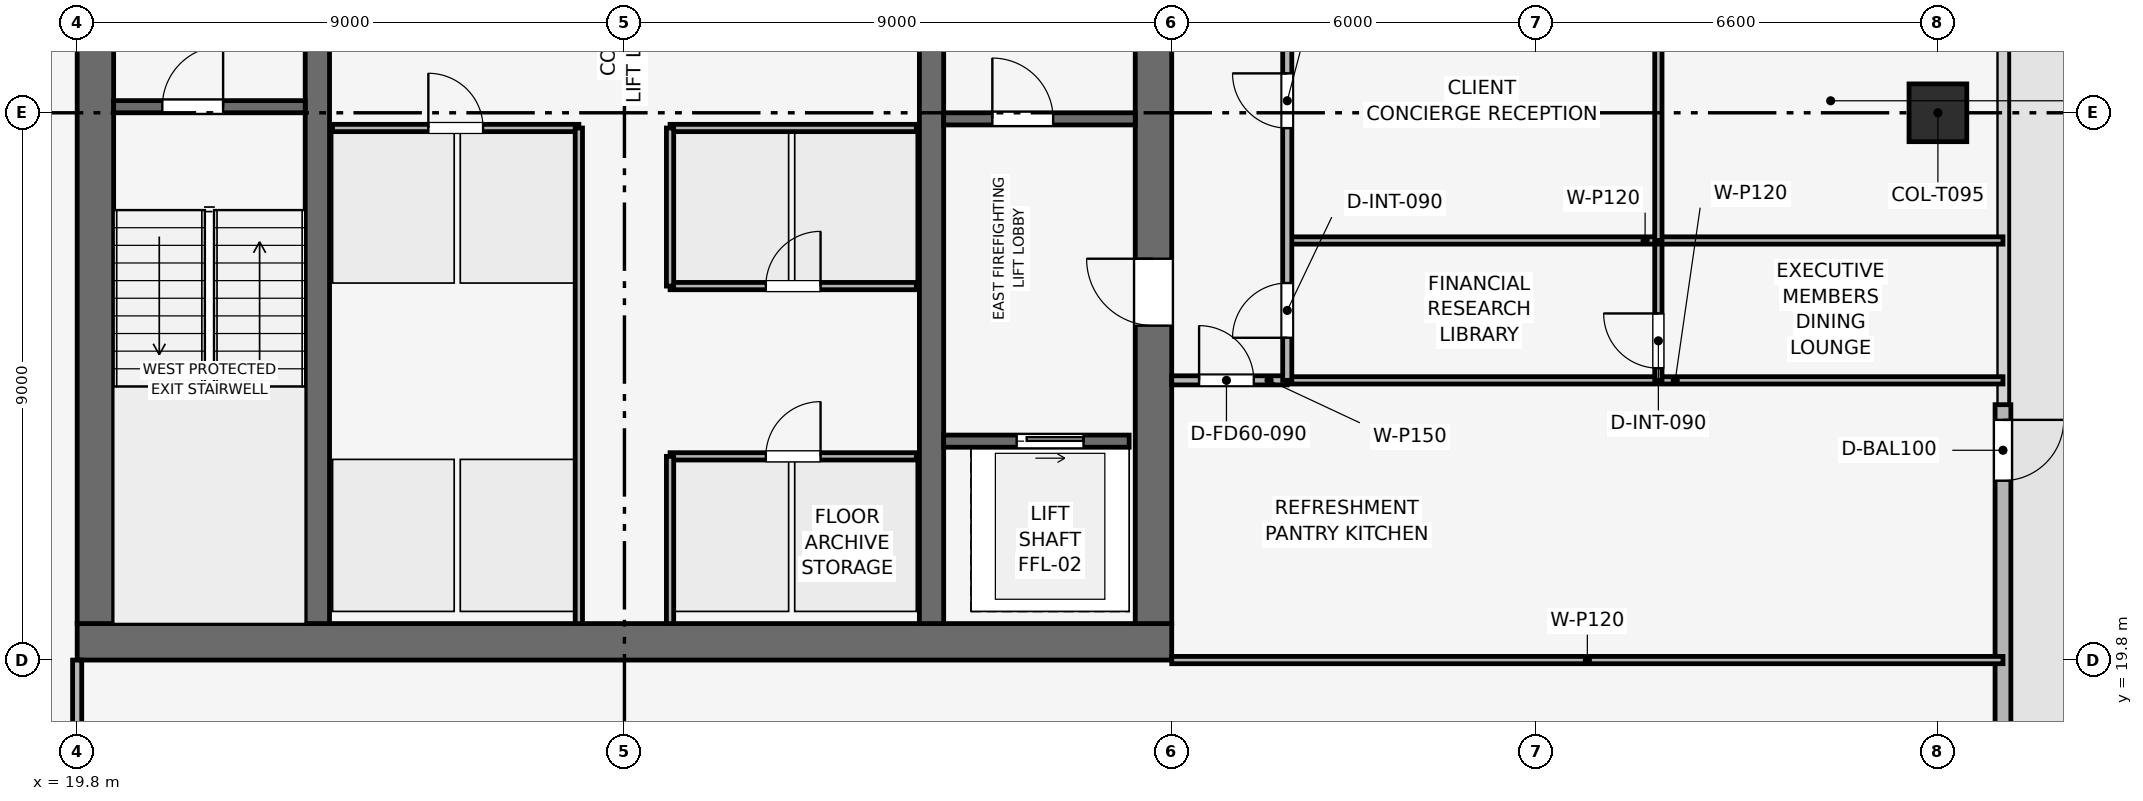
"""IFC4 building model, lengths in metres.
Left out: names, types, materials, properties, quantities, classifications, styles, units other than length and angle.
Written with IfcOpenShell. Run it as: python <this file> out.ifc"""

import sys

from ifc_helpers import new_model, si_unit, direction, frame, frame_2d, origin, origin_2d, place, context, subcontext, project, spatial, rectangle, extrude, element, fill, save


model = new_model("IFC4")
c1 = context("Model", 3, precision=1e-05, world=origin(), true_north=direction((0.0, 1.0)))
c2 = subcontext(c1, "Body", "Model", "MODEL_VIEW")
j1 = project(units=[si_unit("LENGTHUNIT", "METRE"), si_unit("PLANEANGLEUNIT", "RADIAN")], contexts=[c1])
p1 = place(None, origin())
s1 = spatial("IfcSite", under=j1, at=p1, CompositionType="ELEMENT")
p2 = place(p1, origin())
s2 = spatial("IfcBuilding", under=s1, at=p2, CompositionType="ELEMENT")
p3 = place(p2, frame((0.0, 0.0, 303.0)))
s3 = spatial("IfcBuildingStorey", under=s2, at=p3, CompositionType="ELEMENT", Elevation=303.0)
p4 = place(p3, frame((19.8, 20.1, 0.0), z_axis=(0.0, 0.0, 1.0), x_axis=(1.0, 0.0, 0.0)))
e1 = element("IfcWall", 1, at=p4, inside=s3, PredefinedType="SHEAR", context=c2, shape_type="SweptSolid", body=[
    extrude(rectangle(XDim=18.0, YDim=0.6, at=frame_2d((9.0, 0.0))), origin(), (0.0, 0.0, 1.0), 3.75),
])
p5 = place(p3, frame((20.1, 20.4, 0.0), z_axis=(0.0, 0.0, 1.0), x_axis=(0.0, 1.0, 0.0)))
e2 = element("IfcWall", 2, at=p5, inside=s3, PredefinedType="SHEAR", context=c2, shape_type="SweptSolid", body=[
    extrude(rectangle(XDim=16.8, YDim=0.6, at=frame_2d((8.4, 0.0))), origin(), (0.0, 0.0, 1.0), 3.75),
])
p6 = place(p5, frame((10.4, 0.0, 0.0)))
e3 = element("IfcOpeningElement", 3, at=p6, cuts=e2, PredefinedType="OPENING", context=c2, shape_type="SweptSolid", body=[
    extrude(rectangle(XDim=1.1, YDim=2.15, at=frame_2d((0.55, 1.075))), frame((0.0, 0.31, 0.0), z_axis=(0.0, -1.0, 0.0), x_axis=(1.0, 0.0, 0.0)), (0.0, 0.0, 1.0), 0.62),
])
p7 = place(p3, frame((37.5, 20.4, 0.0), z_axis=(0.0, 0.0, 1.0), x_axis=(0.0, 1.0, 0.0)))
e4 = element("IfcWall", 4, at=p7, inside=s3, PredefinedType="SHEAR", context=c2, shape_type="SweptSolid", body=[
    extrude(rectangle(XDim=16.8, YDim=0.6, at=frame_2d((8.4, 0.0))), origin(), (0.0, 0.0, 1.0), 3.75),
])
p8 = place(p7, frame((4.9, 0.0, 0.0)))
e5 = element("IfcOpeningElement", 5, at=p8, cuts=e4, PredefinedType="OPENING", context=c2, shape_type="SweptSolid", body=[
    extrude(rectangle(XDim=1.1, YDim=2.15, at=frame_2d((0.55, 1.075))), frame((0.0, 0.31, 0.0), z_axis=(0.0, -1.0, 0.0), x_axis=(1.0, 0.0, 0.0)), (0.0, 0.0, 1.0), 0.62),
])
for number, where, z_axis, x_axis in (
    (6, (23.75, 20.4, 0.0), (0.0, 0.0, 1.0), (0.0, 1.0, 0.0)),
    (7, (33.85, 20.4, 0.0), (0.0, 0.0, 1.0), (0.0, 1.0, 0.0)),
):
    element("IfcWall", number, at=place(p3, frame(where, z_axis=z_axis, x_axis=x_axis)), inside=s3, PredefinedType="SHEAR", context=c2, shape_type="SweptSolid", body=[
        extrude(rectangle(XDim=16.8, YDim=0.4, at=frame_2d((8.4, 0.0))), origin(), (0.0, 0.0, 1.0), 3.75),
    ])
p9 = place(p3, frame((50.4, 28.8, 0.003), z_axis=(0.0, 0.0, 1.0), x_axis=(1.0, 0.0, 0.0)))
e8 = element("IfcColumn", 8, at=p9, inside=s3, PredefinedType="COLUMN", context=c2, shape_type="SweptSolid", body=[
    extrude(rectangle(XDim=0.95, YDim=0.95, at=origin_2d()), origin(), (0.0, 0.0, 1.0), 3.504),
])
p10 = place(p3, frame((51.47, 24.0, 0.0), z_axis=(0.0, 0.0, 1.0), x_axis=(0.0, -1.0, 0.0)))
e9 = element("IfcWall", 9, at=p10, inside=s3, PredefinedType="SOLIDWALL", context=c2, shape_type="SweptSolid", body=[
    extrude(rectangle(XDim=11.7, YDim=0.26, at=frame_2d((5.85, 0.0))), origin(), (0.0, 0.0, 1.0), 3.51),
])
p11 = place(p10, frame((0.25, 0.0, 0.0)))
e10 = element("IfcOpeningElement", 10, at=p11, cuts=e9, PredefinedType="OPENING", context=c2, shape_type="SweptSolid", body=[
    extrude(rectangle(XDim=1.0, YDim=2.2, at=frame_2d((0.5, 1.1))), frame((0.0, 0.14, 0.0), z_axis=(0.0, -1.0, 0.0), x_axis=(1.0, 0.0, 0.0)), (0.0, 0.0, 1.0), 0.28),
])
p12 = place(p3, frame((20.4, 28.9, 0.0), z_axis=(0.0, 0.0, 1.0), x_axis=(1.0, 0.0, 0.0)))
e11 = element("IfcWall", 11, at=p12, inside=s3, PredefinedType="SHEAR", context=c2, shape_type="SweptSolid", body=[
    extrude(rectangle(XDim=3.15, YDim=0.2, at=frame_2d((1.575, 0.0))), origin(), (0.0, 0.0, 1.0), 3.51),
])
p13 = place(p12, frame((0.8, 0.0, 0.0)))
e12 = element("IfcOpeningElement", 12, at=p13, cuts=e11, PredefinedType="OPENING", context=c2, shape_type="SweptSolid", body=[
    extrude(rectangle(XDim=1.0, YDim=2.1, at=frame_2d((0.5, 1.05))), frame((0.0, 0.11, 0.0), z_axis=(0.0, -1.0, 0.0), x_axis=(1.0, 0.0, 0.0)), (0.0, 0.0, 1.0), 0.22),
])
p14 = place(p3, frame((34.05, 28.7, 0.0), z_axis=(0.0, 0.0, 1.0), x_axis=(1.0, 0.0, 0.0)))
e13 = element("IfcWall", 13, at=p14, inside=s3, PredefinedType="SHEAR", context=c2, shape_type="SweptSolid", body=[
    extrude(rectangle(XDim=3.15, YDim=0.2, at=frame_2d((1.575, 0.0))), origin(), (0.0, 0.0, 1.0), 3.51),
])
p15 = place(p14, frame((0.8, 0.0, 0.0)))
e14 = element("IfcOpeningElement", 14, at=p15, cuts=e13, PredefinedType="OPENING", context=c2, shape_type="SweptSolid", body=[
    extrude(rectangle(XDim=1.0, YDim=2.1, at=frame_2d((0.5, 1.05))), frame((0.0, 0.11, 0.0), z_axis=(0.0, -1.0, 0.0), x_axis=(1.0, 0.0, 0.0)), (0.0, 0.0, 1.0), 0.22),
])
p16 = place(p3, frame((34.05, 23.4, 0.0), z_axis=(0.0, 0.0, 1.0), x_axis=(1.0, 0.0, 0.0)))
e15 = element("IfcWall", 15, at=p16, inside=s3, PredefinedType="SHEAR", context=c2, shape_type="SweptSolid", body=[
    extrude(rectangle(XDim=3.05, YDim=0.2, at=frame_2d((1.525, 0.0))), origin(), (0.0, 0.0, 1.0), 3.51),
])
p17 = place(p16, frame((1.2, 0.0, 0.0)))
e16 = element("IfcOpeningElement", 16, at=p17, cuts=e15, PredefinedType="OPENING", context=c2, shape_type="SweptSolid", body=[
    extrude(rectangle(XDim=1.1, YDim=2.15, at=frame_2d((0.55, 1.075))), frame((0.0, 0.11, 0.0), z_axis=(0.0, -1.0, 0.0), x_axis=(1.0, 0.0, 0.0)), (0.0, 0.0, 1.0), 0.22),
])
p18 = place(p3, frame((24.0, 28.55, 0.0), z_axis=(0.0, 0.0, 1.0), x_axis=(1.0, 0.0, 0.0)))
e17 = element("IfcWall", 17, at=p18, inside=s3, PredefinedType="PARTITIONING", context=c2, shape_type="SweptSolid", body=[
    extrude(rectangle(XDim=4.05, YDim=0.12, at=frame_2d((2.025, 0.0))), origin(), (0.0, 0.0, 1.0), 3.51),
])
p19 = place(p18, frame((1.575, 0.0, 0.0)))
e18 = element("IfcOpeningElement", 18, at=p19, cuts=e17, PredefinedType="OPENING", context=c2, shape_type="SweptSolid", body=[
    extrude(rectangle(XDim=0.9, YDim=2.1, at=frame_2d((0.45, 1.05))), frame((0.0, 0.07, 0.0), z_axis=(0.0, -1.0, 0.0), x_axis=(1.0, 0.0, 0.0)), (0.0, 0.0, 1.0), 0.14),
])
p20 = place(p3, frame((28.05, 20.4, 0.0), z_axis=(0.0, 0.0, 1.0), x_axis=(0.0, 1.0, 0.0)))
e19 = element("IfcWall", 19, at=p20, inside=s3, PredefinedType="PARTITIONING", context=c2, shape_type="SweptSolid", body=[
    extrude(rectangle(XDim=8.15, YDim=0.12, at=frame_2d((4.075, 0.0))), origin(), (0.0, 0.0, 1.0), 3.51),
])
p21 = place(p3, frame((29.55, 23.15, 0.0), z_axis=(0.0, 0.0, 1.0), x_axis=(1.0, 0.0, 0.0)))
e20 = element("IfcWall", 20, at=p21, inside=s3, PredefinedType="PARTITIONING", context=c2, shape_type="SweptSolid", body=[
    extrude(rectangle(XDim=4.05, YDim=0.12, at=frame_2d((2.025, 0.0))), origin(), (0.0, 0.0, 1.0), 3.51),
])
p22 = place(p21, frame((1.575, 0.0, 0.0)))
e21 = element("IfcOpeningElement", 21, at=p22, cuts=e20, PredefinedType="OPENING", context=c2, shape_type="SweptSolid", body=[
    extrude(rectangle(XDim=0.9, YDim=2.1, at=frame_2d((0.45, 1.05))), frame((0.0, 0.07, 0.0), z_axis=(0.0, -1.0, 0.0), x_axis=(1.0, 0.0, 0.0)), (0.0, 0.0, 1.0), 0.14),
])
p23 = place(p3, frame((29.55, 20.4, 0.0), z_axis=(0.0, 0.0, 1.0), x_axis=(0.0, 1.0, 0.0)))
e22 = element("IfcWall", 22, at=p23, inside=s3, PredefinedType="PARTITIONING", context=c2, shape_type="SweptSolid", body=[
    extrude(rectangle(XDim=2.75, YDim=0.12, at=frame_2d((1.375, 0.0))), origin(), (0.0, 0.0, 1.0), 3.51),
])
p24 = place(p3, frame((29.55, 25.95, 0.0), z_axis=(0.0, 0.0, 1.0), x_axis=(1.0, 0.0, 0.0)))
e23 = element("IfcWall", 23, at=p24, inside=s3, PredefinedType="PARTITIONING", context=c2, shape_type="SweptSolid", body=[
    extrude(rectangle(XDim=4.05, YDim=0.12, at=frame_2d((2.025, 0.0))), origin(), (0.0, 0.0, 1.0), 3.51),
])
p25 = place(p24, frame((1.575, 0.0, 0.0)))
e24 = element("IfcOpeningElement", 24, at=p25, cuts=e23, PredefinedType="OPENING", context=c2, shape_type="SweptSolid", body=[
    extrude(rectangle(XDim=0.9, YDim=2.1, at=frame_2d((0.45, 1.05))), frame((0.0, 0.07, 0.0), z_axis=(0.0, -1.0, 0.0), x_axis=(1.0, 0.0, 0.0)), (0.0, 0.0, 1.0), 0.14),
])
p26 = place(p3, frame((29.55, 28.55, 0.0), z_axis=(0.0, 0.0, 1.0), x_axis=(1.0, 0.0, 0.0)))
e25 = element("IfcWall", 25, at=p26, inside=s3, PredefinedType="PARTITIONING", context=c2, shape_type="SweptSolid", body=[
    extrude(rectangle(XDim=4.05, YDim=0.12, at=frame_2d((2.025, 0.0))), origin(), (0.0, 0.0, 1.0), 3.51),
])
p27 = place(p3, frame((29.55, 25.95, 0.0), z_axis=(0.0, 0.0, 1.0), x_axis=(0.0, 1.0, 0.0)))
e26 = element("IfcWall", 26, at=p27, inside=s3, PredefinedType="PARTITIONING", context=c2, shape_type="SweptSolid", body=[
    extrude(rectangle(XDim=2.6, YDim=0.12, at=frame_2d((1.3, 0.0))), origin(), (0.0, 0.0, 1.0), 3.51),
])
p28 = place(p3, frame((19.8, 6.13, 0.0), z_axis=(0.0, 0.0, 1.0), x_axis=(0.0, 1.0, 0.0)))
e27 = element("IfcWall", 27, at=p28, inside=s3, PredefinedType="PARTITIONING", context=c2, shape_type="SweptSolid", body=[
    extrude(rectangle(XDim=13.67, YDim=0.15, at=frame_2d((6.835, 0.0))), origin(), (0.0, 0.0, 1.0), 3.095),
])
p29 = place(p28, frame((9.47, 0.0, 0.0)))
e28 = element("IfcOpeningElement", 28, at=p29, cuts=e27, PredefinedType="OPENING", context=c2, shape_type="SweptSolid", body=[
    extrude(rectangle(XDim=0.9, YDim=2.1, at=frame_2d((0.45, 1.05))), frame((0.0, 0.085, 0.0), z_axis=(0.0, -1.0, 0.0), x_axis=(1.0, 0.0, 0.0)), (0.0, 0.0, 1.0), 0.17),
])
p30 = place(p3, frame((37.8, 19.8, 0.0), z_axis=(0.0, 0.0, 1.0), x_axis=(1.0, 0.0, 0.0)))
e29 = element("IfcWall", 29, at=p30, inside=s3, PredefinedType="PARTITIONING", context=c2, shape_type="SweptSolid", body=[
    extrude(rectangle(XDim=13.67, YDim=0.12, at=frame_2d((6.835, 0.0))), origin(), (0.0, 0.0, 1.0), 3.095),
])
p31 = place(p3, frame((37.8, 24.4, 0.0), z_axis=(0.0, 0.0, 1.0), x_axis=(1.0, 0.0, 0.0)))
e30 = element("IfcWall", 30, at=p31, inside=s3, PredefinedType="PARTITIONING", context=c2, shape_type="SweptSolid", body=[
    extrude(rectangle(XDim=1.9, YDim=0.15, at=frame_2d((0.95, 0.0))), origin(), (0.0, 0.0, 1.0), 3.51),
])
p32 = place(p31, frame((0.45, 0.0, 0.0)))
e31 = element("IfcOpeningElement", 31, at=p32, cuts=e30, PredefinedType="OPENING", context=c2, shape_type="SweptSolid", body=[
    extrude(rectangle(XDim=0.9, YDim=2.1, at=frame_2d((0.45, 1.05))), frame((0.0, 0.085, 0.0), z_axis=(0.0, -1.0, 0.0), x_axis=(1.0, 0.0, 0.0)), (0.0, 0.0, 1.0), 0.17),
])
p33 = place(p3, frame((39.7, 24.4, 0.0), z_axis=(0.0, 0.0, 1.0), x_axis=(1.0, 0.0, 0.0)))
e32 = element("IfcWall", 32, at=p33, inside=s3, PredefinedType="PARTITIONING", context=c2, shape_type="SweptSolid", body=[
    extrude(rectangle(XDim=11.77, YDim=0.12, at=frame_2d((5.885, 0.0))), origin(), (0.0, 0.0, 1.0), 3.135),
])
p34 = place(p3, frame((45.803, 24.4, 0.0), z_axis=(0.0, 0.0, 1.0), x_axis=(0.0, 1.0, 0.0)))
e33 = element("IfcWall", 33, at=p34, inside=s3, PredefinedType="PARTITIONING", context=c2, shape_type="SweptSolid", body=[
    extrude(rectangle(XDim=2.3, YDim=0.12, at=frame_2d((1.15, 0.0))), origin(), (0.0, 0.0, 1.0), 3.51),
])
p35 = place(p34, frame((0.2, 0.0, 0.0)))
e34 = element("IfcOpeningElement", 34, at=p35, cuts=e33, PredefinedType="OPENING", context=c2, shape_type="SweptSolid", body=[
    extrude(rectangle(XDim=0.9, YDim=2.1, at=frame_2d((0.45, 1.05))), frame((0.0, 0.07, 0.0), z_axis=(0.0, -1.0, 0.0), x_axis=(1.0, 0.0, 0.0)), (0.0, 0.0, 1.0), 0.14),
])
p36 = place(p3, frame((39.7, 26.7, 0.0), z_axis=(0.0, 0.0, 1.0), x_axis=(1.0, 0.0, 0.0)))
e35 = element("IfcWall", 35, at=p36, inside=s3, PredefinedType="PARTITIONING", context=c2, shape_type="SweptSolid", body=[
    extrude(rectangle(XDim=11.77, YDim=0.12, at=frame_2d((5.885, 0.0))), origin(), (0.0, 0.0, 1.0), 3.135),
])
p37 = place(p3, frame((45.803, 26.7, 0.0), z_axis=(0.0, 0.0, 1.0), x_axis=(0.0, 1.0, 0.0)))
e36 = element("IfcWall", 36, at=p37, inside=s3, PredefinedType="PARTITIONING", context=c2, shape_type="SweptSolid", body=[
    extrude(rectangle(XDim=4.595, YDim=0.12, at=frame_2d((2.297, 0.0))), origin(), (0.0, 0.0, 1.0), 3.095),
])
p38 = place(p37, frame((3.495, 0.0, 0.0)))
e37 = element("IfcOpeningElement", 37, at=p38, cuts=e36, PredefinedType="OPENING", context=c2, shape_type="SweptSolid", body=[
    extrude(rectangle(XDim=0.9, YDim=2.1, at=frame_2d((0.45, 1.05))), frame((0.0, 0.07, 0.0), z_axis=(0.0, -1.0, 0.0), x_axis=(1.0, 0.0, 0.0)), (0.0, 0.0, 1.0), 0.14),
])
p39 = place(p3, frame((39.7, 24.4, 0.0), z_axis=(0.0, 0.0, 1.0), x_axis=(0.0, 1.0, 0.0)))
e38 = element("IfcWall", 38, at=p39, inside=s3, PredefinedType="PARTITIONING", context=c2, shape_type="SweptSolid", body=[
    extrude(rectangle(XDim=15.3, YDim=0.15, at=frame_2d((7.65, 0.0))), origin(), (0.0, 0.0, 1.0), 3.095),
])
p40 = place(p39, frame((0.7, 0.0, 0.0)))
e39 = element("IfcOpeningElement", 39, at=p40, cuts=e38, PredefinedType="OPENING", context=c2, shape_type="SweptSolid", body=[
    extrude(rectangle(XDim=0.9, YDim=2.1, at=frame_2d((0.45, 1.05))), frame((0.0, 0.085, 0.0), z_axis=(0.0, -1.0, 0.0), x_axis=(1.0, 0.0, 0.0)), (0.0, 0.0, 1.0), 0.17),
])
p41 = place(p39, frame((4.148, 0.0, 0.0)))
e40 = element("IfcOpeningElement", 40, at=p41, cuts=e38, PredefinedType="OPENING", context=c2, shape_type="SweptSolid", body=[
    extrude(rectangle(XDim=0.9, YDim=2.1, at=frame_2d((0.45, 1.05))), frame((0.0, 0.085, 0.0), z_axis=(0.0, -1.0, 0.0), x_axis=(1.0, 0.0, 0.0)), (0.0, 0.0, 1.0), 0.17),
])
p42 = place(p39, frame((10.648, 0.0, 0.0)))
e41 = element("IfcOpeningElement", 41, at=p42, cuts=e38, PredefinedType="OPENING", context=c2, shape_type="SweptSolid", body=[
    extrude(rectangle(XDim=0.9, YDim=2.1, at=frame_2d((0.45, 1.05))), frame((0.0, 0.085, 0.0), z_axis=(0.0, -1.0, 0.0), x_axis=(1.0, 0.0, 0.0)), (0.0, 0.0, 1.0), 0.17),
])
p43 = place(p11, origin())
e42 = element("IfcDoor", 42, at=p43, inside=s3, OperationType="SINGLE_SWING_LEFT", PredefinedType="DOOR", context=c2, shape_type="SweptSolid", body=[
    extrude(rectangle(XDim=1.0, YDim=2.2, at=frame_2d((0.5, 1.1))), frame((0.0, 0.025, 0.0), z_axis=(0.0, -1.0, 0.0), x_axis=(1.0, 0.0, 0.0)), (0.0, 0.0, 1.0), 0.05),
])
fill(e10, e42)
p44 = place(p13, origin())
e43 = element("IfcDoor", 43, at=p44, inside=s3, OperationType="SINGLE_SWING_RIGHT", PredefinedType="DOOR", context=c2, shape_type="SweptSolid", body=[
    extrude(rectangle(XDim=1.0, YDim=2.1, at=frame_2d((0.5, 1.05))), frame((0.0, 0.025, 0.0), z_axis=(0.0, -1.0, 0.0), x_axis=(1.0, 0.0, 0.0)), (0.0, 0.0, 1.0), 0.05),
])
fill(e12, e43)
p45 = place(p15, origin())
e44 = element("IfcDoor", 44, at=p45, inside=s3, OperationType="SINGLE_SWING_LEFT", PredefinedType="DOOR", context=c2, shape_type="SweptSolid", body=[
    extrude(rectangle(XDim=1.0, YDim=2.1, at=frame_2d((0.5, 1.05))), frame((0.0, 0.025, 0.0), z_axis=(0.0, -1.0, 0.0), x_axis=(1.0, 0.0, 0.0)), (0.0, 0.0, 1.0), 0.05),
])
fill(e14, e44)
p46 = place(p17, origin())
e45 = element("IfcDoor", 45, at=p46, inside=s3, OperationType="SLIDING_TO_RIGHT", PredefinedType="DOOR", context=c2, shape_type="SweptSolid", body=[
    extrude(rectangle(XDim=1.1, YDim=2.15, at=frame_2d((0.55, 1.075))), frame((0.0, 0.025, 0.0), z_axis=(0.0, -1.0, 0.0), x_axis=(1.0, 0.0, 0.0)), (0.0, 0.0, 1.0), 0.05),
])
fill(e16, e45)
p47 = place(p19, origin())
e46 = element("IfcDoor", 46, at=p47, inside=s3, OperationType="SINGLE_SWING_LEFT", PredefinedType="DOOR", context=c2, shape_type="SweptSolid", body=[
    extrude(rectangle(XDim=0.9, YDim=2.1, at=frame_2d((0.45, 1.05))), frame((0.0, 0.025, 0.0), z_axis=(0.0, -1.0, 0.0), x_axis=(1.0, 0.0, 0.0)), (0.0, 0.0, 1.0), 0.05),
])
fill(e18, e46)
p48 = place(p22, origin())
e47 = element("IfcDoor", 47, at=p48, inside=s3, OperationType="SINGLE_SWING_RIGHT", PredefinedType="DOOR", context=c2, shape_type="SweptSolid", body=[
    extrude(rectangle(XDim=0.9, YDim=2.1, at=frame_2d((0.45, 1.05))), frame((0.0, 0.025, 0.0), z_axis=(0.0, -1.0, 0.0), x_axis=(1.0, 0.0, 0.0)), (0.0, 0.0, 1.0), 0.05),
])
fill(e21, e47)
p49 = place(p25, origin())
e48 = element("IfcDoor", 48, at=p49, inside=s3, OperationType="SINGLE_SWING_RIGHT", PredefinedType="DOOR", context=c2, shape_type="SweptSolid", body=[
    extrude(rectangle(XDim=0.9, YDim=2.1, at=frame_2d((0.45, 1.05))), frame((0.0, 0.025, 0.0), z_axis=(0.0, -1.0, 0.0), x_axis=(1.0, 0.0, 0.0)), (0.0, 0.0, 1.0), 0.05),
])
fill(e24, e48)
p50 = place(p32, origin())
e49 = element("IfcDoor", 49, at=p50, inside=s3, OperationType="SINGLE_SWING_LEFT", PredefinedType="DOOR", context=c2, shape_type="SweptSolid", body=[
    extrude(rectangle(XDim=0.9, YDim=2.1, at=frame_2d((0.45, 1.05))), frame((0.0, 0.025, 0.0), z_axis=(0.0, -1.0, 0.0), x_axis=(1.0, 0.0, 0.0)), (0.0, 0.0, 1.0), 0.05),
])
fill(e31, e49)
p51 = place(p35, origin())
e50 = element("IfcDoor", 50, at=p51, inside=s3, OperationType="SINGLE_SWING_RIGHT", PredefinedType="DOOR", context=c2, shape_type="SweptSolid", body=[
    extrude(rectangle(XDim=0.9, YDim=2.1, at=frame_2d((0.45, 1.05))), frame((0.0, 0.025, 0.0), z_axis=(0.0, -1.0, 0.0), x_axis=(1.0, 0.0, 0.0)), (0.0, 0.0, 1.0), 0.05),
])
fill(e34, e50)
p52 = place(p40, origin())
e51 = element("IfcDoor", 51, at=p52, inside=s3, OperationType="SINGLE_SWING_LEFT", PredefinedType="DOOR", context=c2, shape_type="SweptSolid", body=[
    extrude(rectangle(XDim=0.9, YDim=2.1, at=frame_2d((0.45, 1.05))), frame((0.0, 0.025, 0.0), z_axis=(0.0, -1.0, 0.0), x_axis=(1.0, 0.0, 0.0)), (0.0, 0.0, 1.0), 0.05),
])
fill(e39, e51)
p53 = place(p41, origin())
e52 = element("IfcDoor", 52, at=p53, inside=s3, OperationType="SINGLE_SWING_RIGHT", PredefinedType="DOOR", context=c2, shape_type="SweptSolid", body=[
    extrude(rectangle(XDim=0.9, YDim=2.1, at=frame_2d((0.45, 1.05))), frame((0.0, 0.025, 0.0), z_axis=(0.0, -1.0, 0.0), x_axis=(1.0, 0.0, 0.0)), (0.0, 0.0, 1.0), 0.05),
])
fill(e40, e52)
p54 = place(p8, origin())
e53 = element("IfcDoor", 53, at=p54, inside=s3, OperationType="SINGLE_SWING_RIGHT", PredefinedType="DOOR", context=c2, shape_type="SweptSolid", body=[
    extrude(rectangle(XDim=1.1, YDim=2.15, at=frame_2d((0.55, 1.075))), frame((0.0, 0.025, 0.0), z_axis=(0.0, -1.0, 0.0), x_axis=(1.0, 0.0, 0.0)), (0.0, 0.0, 1.0), 0.05),
])
fill(e5, e53)
save(model, sys.argv[1])
